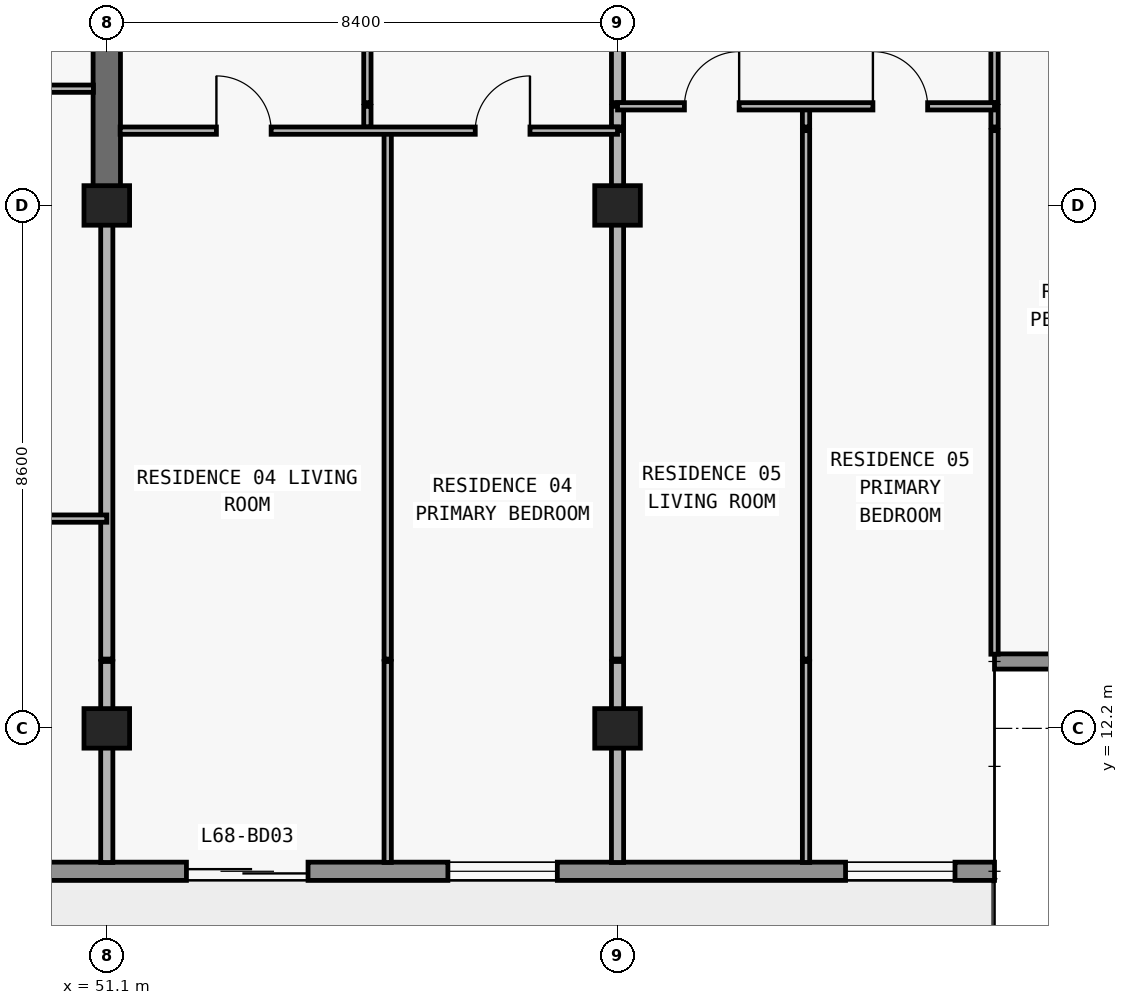
"""IFC4 building model, lengths in metres.
Left out: names, types, materials, properties, quantities, classifications, styles, units other than length and angle.
Written with IfcOpenShell. Run it as: python <this file> out.ifc"""

import sys

from ifc_helpers import new_model, si_unit, direction, frame, frame_2d, origin, origin_2d, place, context, subcontext, project, spatial, rectangle, extrude, element, fill, save


model = new_model("IFC4")
c1 = context("Model", 3, precision=1e-05, world=origin(), true_north=direction((0.0, 1.0)))
c2 = subcontext(c1, "Body", "Model", "MODEL_VIEW")
j1 = project(units=[si_unit("LENGTHUNIT", "METRE"), si_unit("PLANEANGLEUNIT", "RADIAN")], contexts=[c1])
p1 = place(None, origin())
s1 = spatial("IfcSite", under=j1, at=p1, CompositionType="ELEMENT")
p2 = place(p1, origin())
s2 = spatial("IfcBuilding", under=s1, at=p2, CompositionType="ELEMENT")
p3 = place(p2, frame((0.0, 0.0, 243.0)))
s3 = spatial("IfcBuildingStorey", under=s2, at=p3, CompositionType="ELEMENT", Elevation=243.0)
for number, where, z_axis, x_axis in (
    (1, (51.1, 12.2, 0.0), (0.0, 0.0, 1.0), (1.0, 0.0, 0.0)),
    (2, (59.5, 12.2, 0.0), (0.0, 0.0, 1.0), (1.0, 0.0, 0.0)),
    (3, (51.1, 20.8, 0.0), (0.0, 0.0, 1.0), (1.0, 0.0, 0.0)),
    (4, (59.5, 20.8, 0.0), (0.0, 0.0, 1.0), (1.0, 0.0, 0.0)),
):
    element("IfcColumn", number, at=place(p3, frame(where, z_axis=z_axis, x_axis=x_axis)), inside=s3, PredefinedType="COLUMN", context=c2, shape_type="SweptSolid", body=[
        extrude(rectangle(XDim=0.75, YDim=0.65, at=origin_2d()), origin(), (0.0, 0.0, 1.0), 3.05),
    ])
p4 = place(p3, frame((51.1, 20.8, 0.0), z_axis=(0.0, 0.0, 1.0), x_axis=(0.0, 1.0, 0.0)))
e5 = element("IfcWall", 5, at=p4, inside=s3, PredefinedType="SHEAR", context=c2, shape_type="SweptSolid", body=[
    extrude(rectangle(XDim=8.6, YDim=0.45, at=frame_2d((4.3, 0.0))), origin(), (0.0, 0.0, 1.0), 3.05),
])
p5 = place(p3, frame((65.7, 9.85, 0.0), z_axis=(0.0, 0.0, 1.0), x_axis=(-1.0, 0.0, 0.0)))
e6 = element("IfcWall", 6, at=p5, inside=s3, PredefinedType="STANDARD", context=c2, shape_type="SweptSolid", body=[
    extrude(rectangle(XDim=53.6, YDim=0.3, at=frame_2d((26.8, 0.0))), origin(), (0.0, 0.0, 1.0), 3.05),
])
p6 = place(p5, frame((48.05, 0.0, 0.85)))
e7 = element("IfcOpeningElement", 7, at=p6, cuts=e6, PredefinedType="OPENING", context=c2, shape_type="SweptSolid", body=[
    extrude(rectangle(XDim=1.8, YDim=1.55, at=frame_2d((0.9, 0.775))), frame((0.0, 0.16, 0.0), z_axis=(0.0, -1.0, 0.0), x_axis=(1.0, 0.0, 0.0)), (0.0, 0.0, 1.0), 0.32),
])
p7 = place(p5, frame((44.09, 0.0, 0.0)))
e8 = element("IfcOpeningElement", 8, at=p7, cuts=e6, PredefinedType="OPENING", context=c2, shape_type="SweptSolid", body=[
    extrude(rectangle(XDim=2.0, YDim=2.3, at=frame_2d((1.0, 1.15))), frame((0.0, 0.16, 0.0), z_axis=(0.0, -1.0, 0.0), x_axis=(1.0, 0.0, 0.0)), (0.0, 0.0, 1.0), 0.32),
])
p8 = place(p5, frame((39.99, 0.0, 0.85)))
e9 = element("IfcOpeningElement", 9, at=p8, cuts=e6, PredefinedType="OPENING", context=c2, shape_type="SweptSolid", body=[
    extrude(rectangle(XDim=1.8, YDim=1.55, at=frame_2d((0.9, 0.775))), frame((0.0, 0.16, 0.0), z_axis=(0.0, -1.0, 0.0), x_axis=(1.0, 0.0, 0.0)), (0.0, 0.0, 1.0), 0.32),
])
p9 = place(p5, frame((36.09, 0.0, 0.0)))
e10 = element("IfcOpeningElement", 10, at=p9, cuts=e6, PredefinedType="OPENING", context=c2, shape_type="SweptSolid", body=[
    extrude(rectangle(XDim=2.0, YDim=2.3, at=frame_2d((1.0, 1.15))), frame((0.0, 0.16, 0.0), z_axis=(0.0, -1.0, 0.0), x_axis=(1.0, 0.0, 0.0)), (0.0, 0.0, 1.0), 0.32),
])
p10 = place(p5, frame((31.41, 0.0, 0.65)))
e11 = element("IfcOpeningElement", 11, at=p10, cuts=e6, PredefinedType="OPENING", context=c2, shape_type="SweptSolid", body=[
    extrude(rectangle(XDim=2.6, YDim=1.85, at=frame_2d((1.3, 0.925))), frame((0.0, 0.16, 0.0), z_axis=(0.0, -1.0, 0.0), x_axis=(1.0, 0.0, 0.0)), (0.0, 0.0, 1.0), 0.32),
])
p11 = place(p5, frame((25.7, 0.0, 0.85)))
e12 = element("IfcOpeningElement", 12, at=p11, cuts=e6, PredefinedType="OPENING", context=c2, shape_type="SweptSolid", body=[
    extrude(rectangle(XDim=2.2, YDim=1.55, at=frame_2d((1.1, 0.775))), frame((0.0, 0.16, 0.0), z_axis=(0.0, -1.0, 0.0), x_axis=(1.0, 0.0, 0.0)), (0.0, 0.0, 1.0), 0.32),
])
p12 = place(p5, frame((17.7, 0.0, 0.85)))
e13 = element("IfcOpeningElement", 13, at=p12, cuts=e6, PredefinedType="OPENING", context=c2, shape_type="SweptSolid", body=[
    extrude(rectangle(XDim=2.2, YDim=1.55, at=frame_2d((1.1, 0.775))), frame((0.0, 0.16, 0.0), z_axis=(0.0, -1.0, 0.0), x_axis=(1.0, 0.0, 0.0)), (0.0, 0.0, 1.0), 0.32),
])
p13 = place(p5, frame((11.29, 0.0, 0.0)))
e14 = element("IfcOpeningElement", 14, at=p13, cuts=e6, PredefinedType="OPENING", context=c2, shape_type="SweptSolid", body=[
    extrude(rectangle(XDim=2.0, YDim=2.3, at=frame_2d((1.0, 1.15))), frame((0.0, 0.16, 0.0), z_axis=(0.0, -1.0, 0.0), x_axis=(1.0, 0.0, 0.0)), (0.0, 0.0, 1.0), 0.32),
])
p14 = place(p5, frame((7.19, 0.0, 0.85)))
e15 = element("IfcOpeningElement", 15, at=p14, cuts=e6, PredefinedType="OPENING", context=c2, shape_type="SweptSolid", body=[
    extrude(rectangle(XDim=1.8, YDim=1.55, at=frame_2d((0.9, 0.775))), frame((0.0, 0.16, 0.0), z_axis=(0.0, -1.0, 0.0), x_axis=(1.0, 0.0, 0.0)), (0.0, 0.0, 1.0), 0.32),
])
p15 = place(p5, frame((0.65, 0.0, 0.85)))
e16 = element("IfcOpeningElement", 16, at=p15, cuts=e6, PredefinedType="OPENING", context=c2, shape_type="SweptSolid", body=[
    extrude(rectangle(XDim=1.8, YDim=1.55, at=frame_2d((0.9, 0.775))), frame((0.0, 0.16, 0.0), z_axis=(0.0, -1.0, 0.0), x_axis=(1.0, 0.0, 0.0)), (0.0, 0.0, 1.0), 0.32),
])
p16 = place(p3, frame((65.7, 13.3, 0.0), z_axis=(0.0, 0.0, 1.0), x_axis=(1.0, 0.0, 0.0)))
e17 = element("IfcWall", 17, at=p16, inside=s3, PredefinedType="ELEMENTEDWALL", context=c2, shape_type="SweptSolid", body=[
    extrude(rectangle(XDim=3.85, YDim=0.25, at=frame_2d((1.925, 0.0))), origin(), (0.0, 0.0, 1.0), 3.05),
])
p17 = place(p3, frame((51.1, 9.995, 0.0), z_axis=(0.0, 0.0, 1.0), x_axis=(0.0, 1.0, 0.0)))
e18 = element("IfcWall", 18, at=p17, inside=s3, PredefinedType="PARTITIONING", context=c2, shape_type="SweptSolid", body=[
    extrude(rectangle(XDim=3.305, YDim=0.2, at=frame_2d((1.652, 0.0))), origin(), (0.0, 0.0, 1.0), 2.263),
])
p18 = place(p3, frame((51.1, 13.34, 0.0), z_axis=(0.0, 0.0, 1.0), x_axis=(0.0, 1.0, 0.0)))
e19 = element("IfcWall", 19, at=p18, inside=s3, PredefinedType="PARTITIONING", context=c2, shape_type="SweptSolid", body=[
    extrude(rectangle(XDim=7.455, YDim=0.2, at=frame_2d((3.728, 0.0))), origin(), (0.0, 0.0, 1.0), 2.263),
])
p19 = place(p3, frame((55.386, 22.09, 0.0), z_axis=(0.0, 0.0, 1.0), x_axis=(0.0, 1.0, 0.0)))
e20 = element("IfcWall", 20, at=p19, inside=s3, PredefinedType="PARTITIONING", context=c2, shape_type="SweptSolid", body=[
    extrude(rectangle(XDim=0.34, YDim=0.12, at=frame_2d((0.17, 0.0))), origin(), (0.0, 0.0, 1.0), 3.05),
])
p20 = place(p3, frame((55.386, 22.49, 0.0), z_axis=(0.0, 0.0, 1.0), x_axis=(0.0, 1.0, 0.0)))
e21 = element("IfcWall", 21, at=p20, inside=s3, PredefinedType="PARTITIONING", context=c2, shape_type="SweptSolid", body=[
    extrude(rectangle(XDim=4.69, YDim=0.12, at=frame_2d((2.345, 0.0))), origin(), (0.0, 0.0, 1.0), 3.05),
])
p21 = place(p20, frame((1.895, 0.0, 0.0)))
e22 = element("IfcOpeningElement", 22, at=p21, cuts=e21, PredefinedType="OPENING", context=c2, shape_type="SweptSolid", body=[
    extrude(rectangle(XDim=0.9, YDim=2.15, at=frame_2d((0.45, 1.075))), frame((0.0, 0.07, 0.0), z_axis=(0.0, -1.0, 0.0), x_axis=(1.0, 0.0, 0.0)), (0.0, 0.0, 1.0), 0.14),
])
p22 = place(p3, frame((55.72, 9.995, 0.0), z_axis=(0.0, 0.0, 1.0), x_axis=(0.0, 1.0, 0.0)))
e23 = element("IfcWall", 23, at=p22, inside=s3, PredefinedType="PARTITIONING", context=c2, shape_type="SweptSolid", body=[
    extrude(rectangle(XDim=3.305, YDim=0.12, at=frame_2d((1.652, 0.0))), origin(), (0.0, 0.0, 1.0), 3.05),
])
p23 = place(p3, frame((55.72, 13.34, 0.0), z_axis=(0.0, 0.0, 1.0), x_axis=(0.0, 1.0, 0.0)))
e24 = element("IfcWall", 24, at=p23, inside=s3, PredefinedType="PARTITIONING", context=c2, shape_type="SweptSolid", body=[
    extrude(rectangle(XDim=8.69, YDim=0.12, at=frame_2d((4.345, 0.0))), origin(), (0.0, 0.0, 1.0), 3.05),
])
p24 = place(p3, frame((59.5, 9.995, 0.0), z_axis=(0.0, 0.0, 1.0), x_axis=(0.0, 1.0, 0.0)))
e25 = element("IfcWall", 25, at=p24, inside=s3, PredefinedType="PARTITIONING", context=c2, shape_type="SweptSolid", body=[
    extrude(rectangle(XDim=3.305, YDim=0.2, at=frame_2d((1.652, 0.0))), origin(), (0.0, 0.0, 1.0), 2.263),
])
p25 = place(p3, frame((59.5, 13.34, 0.0), z_axis=(0.0, 0.0, 1.0), x_axis=(0.0, 1.0, 0.0)))
e26 = element("IfcWall", 26, at=p25, inside=s3, PredefinedType="PARTITIONING", context=c2, shape_type="SweptSolid", body=[
    extrude(rectangle(XDim=8.69, YDim=0.2, at=frame_2d((4.345, 0.0))), origin(), (0.0, 0.0, 1.0), 2.263),
])
p26 = place(p3, frame((59.5, 22.09, 0.0), z_axis=(0.0, 0.0, 1.0), x_axis=(0.0, 1.0, 0.0)))
e27 = element("IfcWall", 27, at=p26, inside=s3, PredefinedType="PARTITIONING", context=c2, shape_type="SweptSolid", body=[
    extrude(rectangle(XDim=0.34, YDim=0.2, at=frame_2d((0.17, 0.0))), origin(), (0.0, 0.0, 1.0), 2.263),
])
p27 = place(p3, frame((59.5, 22.49, 0.0), z_axis=(0.0, 0.0, 1.0), x_axis=(0.0, 1.0, 0.0)))
e28 = element("IfcWall", 28, at=p27, inside=s3, PredefinedType="PARTITIONING", context=c2, shape_type="SweptSolid", body=[
    extrude(rectangle(XDim=4.69, YDim=0.2, at=frame_2d((2.345, 0.0))), origin(), (0.0, 0.0, 1.0), 2.263),
])
p28 = place(p3, frame((62.6, 9.995, 0.0), z_axis=(0.0, 0.0, 1.0), x_axis=(0.0, 1.0, 0.0)))
e29 = element("IfcWall", 29, at=p28, inside=s3, PredefinedType="PARTITIONING", context=c2, shape_type="SweptSolid", body=[
    extrude(rectangle(XDim=3.305, YDim=0.12, at=frame_2d((1.652, 0.0))), origin(), (0.0, 0.0, 1.0), 3.05),
])
p29 = place(p3, frame((62.6, 13.34, 0.0), z_axis=(0.0, 0.0, 1.0), x_axis=(0.0, 1.0, 0.0)))
e30 = element("IfcWall", 30, at=p29, inside=s3, PredefinedType="PARTITIONING", context=c2, shape_type="SweptSolid", body=[
    extrude(rectangle(XDim=8.69, YDim=0.12, at=frame_2d((4.345, 0.0))), origin(), (0.0, 0.0, 1.0), 3.05),
])
p30 = place(p3, frame((62.6, 22.09, 0.0), z_axis=(0.0, 0.0, 1.0), x_axis=(0.0, 1.0, 0.0)))
e31 = element("IfcWall", 31, at=p30, inside=s3, PredefinedType="PARTITIONING", context=c2, shape_type="SweptSolid", body=[
    extrude(rectangle(XDim=0.34, YDim=0.12, at=frame_2d((0.17, 0.0))), origin(), (0.0, 0.0, 1.0), 3.05),
])
p31 = place(p3, frame((65.7, 13.42, 0.0), z_axis=(0.0, 0.0, 1.0), x_axis=(0.0, 1.0, 0.0)))
e32 = element("IfcWall", 32, at=p31, inside=s3, PredefinedType="PARTITIONING", context=c2, shape_type="SweptSolid", body=[
    extrude(rectangle(XDim=8.61, YDim=0.12, at=frame_2d((4.305, 0.0))), origin(), (0.0, 0.0, 1.0), 3.05),
])
p32 = place(p3, frame((65.7, 22.09, 0.0), z_axis=(0.0, 0.0, 1.0), x_axis=(0.0, 1.0, 0.0)))
e33 = element("IfcWall", 33, at=p32, inside=s3, PredefinedType="PARTITIONING", context=c2, shape_type="SweptSolid", body=[
    extrude(rectangle(XDim=0.34, YDim=0.12, at=frame_2d((0.17, 0.0))), origin(), (0.0, 0.0, 1.0), 3.05),
])
p33 = place(p3, frame((65.7, 22.49, 0.0), z_axis=(0.0, 0.0, 1.0), x_axis=(0.0, 1.0, 0.0)))
e34 = element("IfcWall", 34, at=p33, inside=s3, PredefinedType="PARTITIONING", context=c2, shape_type="SweptSolid", body=[
    extrude(rectangle(XDim=4.69, YDim=0.12, at=frame_2d((2.345, 0.0))), origin(), (0.0, 0.0, 1.0), 3.05),
])
p34 = place(p33, frame((1.895, 0.0, 0.0)))
e35 = element("IfcOpeningElement", 35, at=p34, cuts=e34, PredefinedType="OPENING", context=c2, shape_type="SweptSolid", body=[
    extrude(rectangle(XDim=0.9, YDim=2.15, at=frame_2d((0.45, 1.075))), frame((0.0, 0.07, 0.0), z_axis=(0.0, -1.0, 0.0), x_axis=(1.0, 0.0, 0.0)), (0.0, 0.0, 1.0), 0.14),
])
p35 = place(p3, frame((41.2, 15.65, 0.0), z_axis=(0.0, 0.0, 1.0), x_axis=(1.0, 0.0, 0.0)))
e36 = element("IfcWall", 36, at=p35, inside=s3, PredefinedType="PARTITIONING", context=c2, shape_type="SweptSolid", body=[
    extrude(rectangle(XDim=9.9, YDim=0.12, at=frame_2d((4.95, 0.0))), origin(), (0.0, 0.0, 1.0), 3.05),
])
p36 = place(p35, frame((5.25, 0.0, 0.0)))
e37 = element("IfcOpeningElement", 37, at=p36, cuts=e36, PredefinedType="OPENING", context=c2, shape_type="SweptSolid", body=[
    extrude(rectangle(XDim=0.9, YDim=2.15, at=frame_2d((0.45, 1.075))), frame((0.0, 0.07, 0.0), z_axis=(0.0, -1.0, 0.0), x_axis=(1.0, 0.0, 0.0)), (0.0, 0.0, 1.0), 0.14),
])
p37 = place(p3, frame((51.32, 22.03, 0.0), z_axis=(0.0, 0.0, 1.0), x_axis=(1.0, 0.0, 0.0)))
e38 = element("IfcWall", 38, at=p37, inside=s3, PredefinedType="PARTITIONING", context=c2, shape_type="SweptSolid", body=[
    extrude(rectangle(XDim=8.18, YDim=0.12, at=frame_2d((4.09, 0.0))), origin(), (0.0, 0.0, 1.0), 3.05),
])
p38 = place(p37, frame((1.583, 0.0, 0.0)))
e39 = element("IfcOpeningElement", 39, at=p38, cuts=e38, PredefinedType="OPENING", context=c2, shape_type="SweptSolid", body=[
    extrude(rectangle(XDim=0.9, YDim=2.15, at=frame_2d((0.45, 1.075))), frame((0.0, 0.07, 0.0), z_axis=(0.0, -1.0, 0.0), x_axis=(1.0, 0.0, 0.0)), (0.0, 0.0, 1.0), 0.14),
])
p39 = place(p37, frame((5.84, 0.0, 0.0)))
e40 = element("IfcOpeningElement", 40, at=p39, cuts=e38, PredefinedType="OPENING", context=c2, shape_type="SweptSolid", body=[
    extrude(rectangle(XDim=0.9, YDim=2.15, at=frame_2d((0.45, 1.075))), frame((0.0, 0.07, 0.0), z_axis=(0.0, -1.0, 0.0), x_axis=(1.0, 0.0, 0.0)), (0.0, 0.0, 1.0), 0.14),
])
p40 = place(p3, frame((59.5, 22.43, 0.0), z_axis=(0.0, 0.0, 1.0), x_axis=(1.0, 0.0, 0.0)))
e41 = element("IfcWall", 41, at=p40, inside=s3, PredefinedType="PARTITIONING", context=c2, shape_type="SweptSolid", body=[
    extrude(rectangle(XDim=6.2, YDim=0.12, at=frame_2d((3.1, 0.0))), origin(), (0.0, 0.0, 1.0), 3.05),
])
p41 = place(p40, frame((1.1, 0.0, 0.0)))
e42 = element("IfcOpeningElement", 42, at=p41, cuts=e41, PredefinedType="OPENING", context=c2, shape_type="SweptSolid", body=[
    extrude(rectangle(XDim=0.9, YDim=2.15, at=frame_2d((0.45, 1.075))), frame((0.0, 0.07, 0.0), z_axis=(0.0, -1.0, 0.0), x_axis=(1.0, 0.0, 0.0)), (0.0, 0.0, 1.0), 0.14),
])
p42 = place(p40, frame((4.2, 0.0, 0.0)))
e43 = element("IfcOpeningElement", 43, at=p42, cuts=e41, PredefinedType="OPENING", context=c2, shape_type="SweptSolid", body=[
    extrude(rectangle(XDim=0.9, YDim=2.15, at=frame_2d((0.45, 1.075))), frame((0.0, 0.07, 0.0), z_axis=(0.0, -1.0, 0.0), x_axis=(1.0, 0.0, 0.0)), (0.0, 0.0, 1.0), 0.14),
])
p43 = place(p3, frame((42.7, 22.72, 0.0), z_axis=(0.0, 0.0, 1.0), x_axis=(1.0, 0.0, 0.0)))
e44 = element("IfcWall", 44, at=p43, inside=s3, PredefinedType="PARTITIONING", context=c2, shape_type="SweptSolid", body=[
    extrude(rectangle(XDim=8.18, YDim=0.12, at=frame_2d((4.09, 0.0))), origin(), (0.0, 0.0, 1.0), 3.05),
])
p44 = place(p43, frame((3.64, 0.0, 0.0)))
e45 = element("IfcOpeningElement", 45, at=p44, cuts=e44, PredefinedType="OPENING", context=c2, shape_type="SweptSolid", body=[
    extrude(rectangle(XDim=0.9, YDim=2.15, at=frame_2d((0.45, 1.075))), frame((0.0, 0.07, 0.0), z_axis=(0.0, -1.0, 0.0), x_axis=(1.0, 0.0, 0.0)), (0.0, 0.0, 1.0), 0.14),
])
p45 = place(p13, origin())
e46 = element("IfcDoor", 46, at=p45, inside=s3, OperationType="DOUBLE_DOOR_SLIDING", PredefinedType="DOOR", context=c2, shape_type="SweptSolid", body=[
    extrude(rectangle(XDim=2.0, YDim=2.3, at=frame_2d((1.0, 1.15))), frame((0.0, 0.025, 0.0), z_axis=(0.0, -1.0, 0.0), x_axis=(1.0, 0.0, 0.0)), (0.0, 0.0, 1.0), 0.05),
])
fill(e14, e46)
p46 = place(p14, origin())
e47 = element("IfcWindow", 47, at=p46, inside=s3, PartitioningType="SINGLE_PANEL", PredefinedType="WINDOW", context=c2, shape_type="SweptSolid", body=[
    extrude(rectangle(XDim=1.8, YDim=1.55, at=frame_2d((0.9, 0.775))), frame((0.0, 0.03, 0.0), z_axis=(0.0, -1.0, 0.0), x_axis=(1.0, 0.0, 0.0)), (0.0, 0.0, 1.0), 0.06),
])
fill(e15, e47)
p47 = place(p15, origin())
e48 = element("IfcWindow", 48, at=p47, inside=s3, PartitioningType="SINGLE_PANEL", PredefinedType="WINDOW", context=c2, shape_type="SweptSolid", body=[
    extrude(rectangle(XDim=1.8, YDim=1.55, at=frame_2d((0.9, 0.775))), frame((0.0, 0.03, 0.0), z_axis=(0.0, -1.0, 0.0), x_axis=(1.0, 0.0, 0.0)), (0.0, 0.0, 1.0), 0.06),
])
fill(e16, e48)
p48 = place(p38, origin())
e49 = element("IfcDoor", 49, at=p48, inside=s3, OperationType="SINGLE_SWING_LEFT", PredefinedType="DOOR", context=c2, shape_type="SweptSolid", body=[
    extrude(rectangle(XDim=0.9, YDim=2.15, at=frame_2d((0.45, 1.075))), frame((0.0, 0.025, 0.0), z_axis=(0.0, -1.0, 0.0), x_axis=(1.0, 0.0, 0.0)), (0.0, 0.0, 1.0), 0.05),
])
fill(e39, e49)
p49 = place(p39, origin())
e50 = element("IfcDoor", 50, at=p49, inside=s3, OperationType="SINGLE_SWING_RIGHT", PredefinedType="DOOR", context=c2, shape_type="SweptSolid", body=[
    extrude(rectangle(XDim=0.9, YDim=2.15, at=frame_2d((0.45, 1.075))), frame((0.0, 0.025, 0.0), z_axis=(0.0, -1.0, 0.0), x_axis=(1.0, 0.0, 0.0)), (0.0, 0.0, 1.0), 0.05),
])
fill(e40, e50)
p50 = place(p41, origin())
e51 = element("IfcDoor", 51, at=p50, inside=s3, OperationType="SINGLE_SWING_RIGHT", PredefinedType="DOOR", context=c2, shape_type="SweptSolid", body=[
    extrude(rectangle(XDim=0.9, YDim=2.15, at=frame_2d((0.45, 1.075))), frame((0.0, 0.025, 0.0), z_axis=(0.0, -1.0, 0.0), x_axis=(1.0, 0.0, 0.0)), (0.0, 0.0, 1.0), 0.05),
])
fill(e42, e51)
p51 = place(p42, origin())
e52 = element("IfcDoor", 52, at=p51, inside=s3, OperationType="SINGLE_SWING_LEFT", PredefinedType="DOOR", context=c2, shape_type="SweptSolid", body=[
    extrude(rectangle(XDim=0.9, YDim=2.15, at=frame_2d((0.45, 1.075))), frame((0.0, 0.025, 0.0), z_axis=(0.0, -1.0, 0.0), x_axis=(1.0, 0.0, 0.0)), (0.0, 0.0, 1.0), 0.05),
])
fill(e43, e52)
save(model, sys.argv[1])
